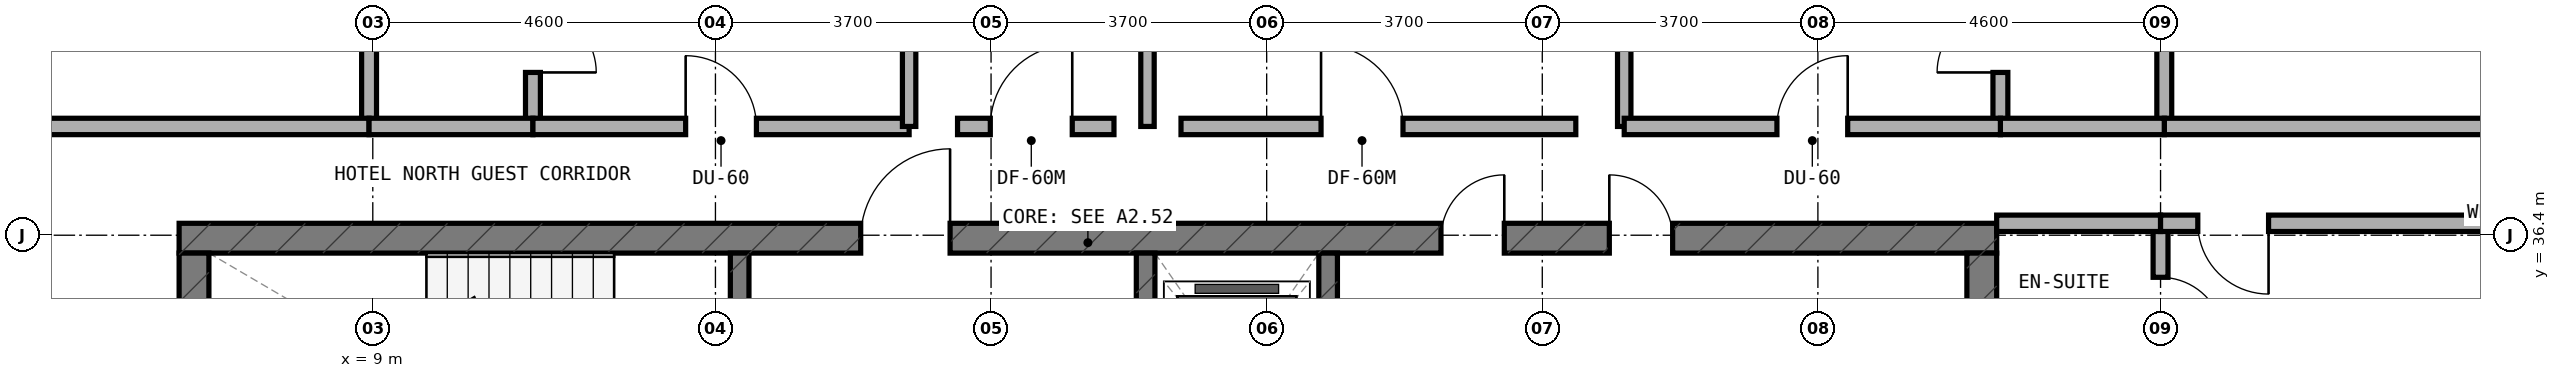
"""IFC4 building model, lengths in metres.
Left out: names, types, materials, properties, quantities, classifications, styles, units other than length and angle.
Written with IfcOpenShell. Run it as: python <this file> out.ifc"""

import sys

from ifc_helpers import new_model, si_unit, direction, frame, frame_2d, origin, place, context, subcontext, project, spatial, rectangle, extrude, element, fill, save


model = new_model("IFC4")
c1 = context("Model", 3, precision=1e-05, world=origin(), true_north=direction((0.0, 1.0)))
c2 = subcontext(c1, "Body", "Model", "MODEL_VIEW")
j1 = project(units=[si_unit("LENGTHUNIT", "METRE"), si_unit("PLANEANGLEUNIT", "RADIAN")], contexts=[c1])
p1 = place(None, origin())
s1 = spatial("IfcSite", under=j1, at=p1, CompositionType="ELEMENT")
p2 = place(p1, origin())
s2 = spatial("IfcBuilding", under=s1, at=p2, CompositionType="ELEMENT")
p3 = place(p2, frame((0.0, 0.0, 243.2)))
s3 = spatial("IfcBuildingStorey", under=s2, at=p3, CompositionType="ELEMENT", Elevation=243.2)
p4 = place(p3, frame((6.4, 36.36, 0.0), z_axis=(0.0, 0.0, 1.0), x_axis=(1.0, 0.0, 0.0)))
e1 = element("IfcWall", 1, at=p4, inside=s3, PredefinedType="SHEAR", context=c2, shape_type="SweptSolid", body=[
    extrude(rectangle(XDim=24.4, YDim=0.4, at=frame_2d((12.2, 0.0))), origin(), (0.0, 0.0, 1.0), 3.6),
])
p5 = place(p4, frame((9.15, 0.0, 0.0)))
e2 = element("IfcOpeningElement", 2, at=p5, cuts=e1, PredefinedType="OPENING", context=c2, shape_type="SweptSolid", body=[
    extrude(rectangle(XDim=1.2, YDim=2.15, at=frame_2d((0.6, 1.075))), frame((0.0, 0.21, 0.0), z_axis=(0.0, -1.0, 0.0), x_axis=(1.0, 0.0, 0.0)), (0.0, 0.0, 1.0), 0.42),
])
p6 = place(p4, frame((19.2, 0.0, 0.0)))
e3 = element("IfcOpeningElement", 3, at=p6, cuts=e1, PredefinedType="OPENING", context=c2, shape_type="SweptSolid", body=[
    extrude(rectangle(XDim=0.85, YDim=2.1, at=frame_2d((0.425, 1.05))), frame((0.0, 0.21, 0.0), z_axis=(0.0, -1.0, 0.0), x_axis=(1.0, 0.0, 0.0)), (0.0, 0.0, 1.0), 0.42),
])
p7 = place(p4, frame((16.94, 0.0, 0.0)))
e4 = element("IfcOpeningElement", 4, at=p7, cuts=e1, PredefinedType="OPENING", context=c2, shape_type="SweptSolid", body=[
    extrude(rectangle(XDim=0.85, YDim=2.1, at=frame_2d((0.425, 1.05))), frame((0.0, 0.21, 0.0), z_axis=(0.0, -1.0, 0.0), x_axis=(1.0, 0.0, 0.0)), (0.0, 0.0, 1.0), 0.42),
])
for number, where, z_axis, x_axis in (
    (5, (6.6, 33.0, 0.0), (0.0, 0.0, 1.0), (0.0, 1.0, 0.0)),
    (6, (30.6, 33.0, 0.0), (0.0, 0.0, 1.0), (0.0, 1.0, 0.0)),
):
    element("IfcWall", number, at=place(p3, frame(where, z_axis=z_axis, x_axis=x_axis)), inside=s3, PredefinedType="SHEAR", context=c2, shape_type="SweptSolid", body=[
        extrude(rectangle(XDim=3.16, YDim=0.4, at=frame_2d((1.58, 0.0))), origin(), (0.0, 0.0, 1.0), 3.6),
    ])
p8 = place(p3, frame((13.925, 33.0, 0.0), z_axis=(0.0, 0.0, 1.0), x_axis=(0.0, 1.0, 0.0)))
e7 = element("IfcWall", 7, at=p8, inside=s3, PredefinedType="STANDARD", context=c2, shape_type="SweptSolid", body=[
    extrude(rectangle(XDim=3.16, YDim=0.25, at=frame_2d((1.58, 0.0))), origin(), (0.0, 0.0, 1.0), 3.32),
])
p9 = place(p8, frame((0.98, 0.0, 0.0)))
e8 = element("IfcOpeningElement", 8, at=p9, cuts=e7, PredefinedType="OPENING", context=c2, shape_type="SweptSolid", body=[
    extrude(rectangle(XDim=1.1, YDim=2.15, at=frame_2d((0.55, 1.075))), frame((0.0, 0.135, 0.0), z_axis=(0.0, -1.0, 0.0), x_axis=(1.0, 0.0, 0.0)), (0.0, 0.0, 1.0), 0.27),
])
p10 = place(p3, frame((19.375, 33.0, 0.0), z_axis=(0.0, 0.0, 1.0), x_axis=(0.0, 1.0, 0.0)))
e9 = element("IfcWall", 9, at=p10, inside=s3, PredefinedType="STANDARD", context=c2, shape_type="SweptSolid", body=[
    extrude(rectangle(XDim=3.16, YDim=0.25, at=frame_2d((1.58, 0.0))), origin(), (0.0, 0.0, 1.0), 3.32),
])
p11 = place(p10, frame((0.98, 0.0, 0.0)))
e10 = element("IfcOpeningElement", 10, at=p11, cuts=e9, PredefinedType="OPENING", context=c2, shape_type="SweptSolid", body=[
    extrude(rectangle(XDim=1.1, YDim=2.15, at=frame_2d((0.55, 1.075))), frame((0.0, 0.135, 0.0), z_axis=(0.0, -1.0, 0.0), x_axis=(1.0, 0.0, 0.0)), (0.0, 0.0, 1.0), 0.27),
])
p12 = place(p3, frame((21.825, 33.0, 0.0), z_axis=(0.0, 0.0, 1.0), x_axis=(0.0, 1.0, 0.0)))
e11 = element("IfcWall", 11, at=p12, inside=s3, PredefinedType="STANDARD", context=c2, shape_type="SweptSolid", body=[
    extrude(rectangle(XDim=3.16, YDim=0.25, at=frame_2d((1.58, 0.0))), origin(), (0.0, 0.0, 1.0), 3.32),
])
p13 = place(p3, frame((11.15, 37.96, 0.0), z_axis=(0.0, 0.0, 1.0), x_axis=(0.0, 1.0, 0.0)))
e12 = element("IfcWall", 12, at=p13, inside=s3, PredefinedType="PLUMBINGWALL", context=c2, shape_type="SweptSolid", body=[
    extrude(rectangle(XDim=2.1, YDim=0.2, at=frame_2d((1.05, 0.0))), origin(), (0.0, 0.0, 1.0), 2.995),
])
p14 = place(p13, frame((0.625, 0.0, 0.0)))
e13 = element("IfcOpeningElement", 13, at=p14, cuts=e12, PredefinedType="OPENING", context=c2, shape_type="SweptSolid", body=[
    extrude(rectangle(XDim=0.85, YDim=2.1, at=frame_2d((0.425, 1.05))), frame((0.0, 0.11, 0.0), z_axis=(0.0, -1.0, 0.0), x_axis=(1.0, 0.0, 0.0)), (0.0, 0.0, 1.0), 0.22),
])
p15 = place(p3, frame((8.95, 37.96, 0.0), z_axis=(0.0, 0.0, 1.0), x_axis=(0.0, 1.0, 0.0)))
e14 = element("IfcWall", 14, at=p15, inside=s3, PredefinedType="PLUMBINGWALL", context=c2, shape_type="SweptSolid", body=[
    extrude(rectangle(XDim=2.1, YDim=0.2, at=frame_2d((1.05, 0.0))), origin(), (0.0, 0.0, 1.0), 2.995),
])
p16 = place(p3, frame((2.76, 37.86, 0.0), z_axis=(0.0, 0.0, 1.0), x_axis=(1.0, 0.0, 0.0)))
e15 = element("IfcWall", 15, at=p16, inside=s3, PredefinedType="SOLIDWALL", context=c2, shape_type="SweptSolid", body=[
    extrude(rectangle(XDim=6.19, YDim=0.22, at=frame_2d((3.095, 0.0))), origin(), (0.0, 0.0, 1.0), 2.745),
])
p17 = place(p3, frame((8.95, 37.86, 0.0), z_axis=(0.0, 0.0, 1.0), x_axis=(1.0, 0.0, 0.0)))
e16 = element("IfcWall", 16, at=p17, inside=s3, PredefinedType="SOLIDWALL", context=c2, shape_type="SweptSolid", body=[
    extrude(rectangle(XDim=2.2, YDim=0.22, at=frame_2d((1.1, 0.0))), origin(), (0.0, 0.0, 1.0), 3.32),
])
p18 = place(p3, frame((11.15, 37.86, 0.0), z_axis=(0.0, 0.0, 1.0), x_axis=(1.0, 0.0, 0.0)))
e17 = element("IfcWall", 17, at=p18, inside=s3, PredefinedType="SOLIDWALL", context=c2, shape_type="SweptSolid", body=[
    extrude(rectangle(XDim=5.05, YDim=0.22, at=frame_2d((2.525, 0.0))), origin(), (0.0, 0.0, 1.0), 2.745),
])
p19 = place(p18, frame((2.05, 0.0, 0.0)))
e18 = element("IfcOpeningElement", 18, at=p19, cuts=e17, PredefinedType="OPENING", context=c2, shape_type="SweptSolid", body=[
    extrude(rectangle(XDim=0.95, YDim=2.1, at=frame_2d((0.475, 1.05))), frame((0.0, 0.12, 0.0), z_axis=(0.0, -1.0, 0.0), x_axis=(1.0, 0.0, 0.0)), (0.0, 0.0, 1.0), 0.24),
])
p20 = place(p3, frame((16.2, 37.86, 0.0), z_axis=(0.0, 0.0, 1.0), x_axis=(0.0, 1.0, 0.0)))
e19 = element("IfcWall", 19, at=p20, inside=s3, PredefinedType="SOLIDWALL", context=c2, shape_type="SweptSolid", body=[
    extrude(rectangle(XDim=5.68, YDim=0.18, at=frame_2d((2.84, 0.0))), origin(), (0.0, 0.0, 1.0), 2.745),
])
p21 = place(p3, frame((19.4, 37.86, 0.0), z_axis=(0.0, 0.0, 1.0), x_axis=(0.0, 1.0, 0.0)))
e20 = element("IfcWall", 20, at=p21, inside=s3, PredefinedType="SOLIDWALL", context=c2, shape_type="SweptSolid", body=[
    extrude(rectangle(XDim=5.68, YDim=0.18, at=frame_2d((2.84, 0.0))), origin(), (0.0, 0.0, 1.0), 2.995),
])
p22 = place(p3, frame((16.85, 37.86, 0.0), z_axis=(0.0, 0.0, 1.0), x_axis=(1.0, 0.0, 0.0)))
e21 = element("IfcWall", 21, at=p22, inside=s3, PredefinedType="SOLIDWALL", context=c2, shape_type="SweptSolid", body=[
    extrude(rectangle(XDim=2.1, YDim=0.22, at=frame_2d((1.05, 0.0))), origin(), (0.0, 0.0, 1.0), 3.32),
])
p23 = place(p22, frame((0.44, 0.0, 0.0)))
e22 = element("IfcOpeningElement", 22, at=p23, cuts=e21, PredefinedType="OPENING", context=c2, shape_type="SweptSolid", body=[
    extrude(rectangle(XDim=1.1, YDim=2.1, at=frame_2d((0.55, 1.05))), frame((0.0, 0.12, 0.0), z_axis=(0.0, -1.0, 0.0), x_axis=(1.0, 0.0, 0.0)), (0.0, 0.0, 1.0), 0.24),
])
p24 = place(p3, frame((19.85, 37.86, 0.0), z_axis=(0.0, 0.0, 1.0), x_axis=(1.0, 0.0, 0.0)))
e23 = element("IfcWall", 23, at=p24, inside=s3, PredefinedType="SOLIDWALL", context=c2, shape_type="SweptSolid", body=[
    extrude(rectangle(XDim=5.3, YDim=0.22, at=frame_2d((2.65, 0.0))), origin(), (0.0, 0.0, 1.0), 3.32),
])
p25 = place(p24, frame((1.88, 0.0, 0.0)))
e24 = element("IfcOpeningElement", 24, at=p25, cuts=e23, PredefinedType="OPENING", context=c2, shape_type="SweptSolid", body=[
    extrude(rectangle(XDim=1.1, YDim=2.1, at=frame_2d((0.55, 1.05))), frame((0.0, 0.12, 0.0), z_axis=(0.0, -1.0, 0.0), x_axis=(1.0, 0.0, 0.0)), (0.0, 0.0, 1.0), 0.24),
])
p26 = place(p3, frame((25.8, 37.86, 0.0), z_axis=(0.0, 0.0, 1.0), x_axis=(0.0, 1.0, 0.0)))
e25 = element("IfcWall", 25, at=p26, inside=s3, PredefinedType="SOLIDWALL", context=c2, shape_type="SweptSolid", body=[
    extrude(rectangle(XDim=5.68, YDim=0.18, at=frame_2d((2.84, 0.0))), origin(), (0.0, 0.0, 1.0), 2.745),
])
p27 = place(p3, frame((30.85, 37.96, 0.0), z_axis=(0.0, 0.0, 1.0), x_axis=(0.0, 1.0, 0.0)))
e26 = element("IfcWall", 26, at=p27, inside=s3, PredefinedType="PLUMBINGWALL", context=c2, shape_type="SweptSolid", body=[
    extrude(rectangle(XDim=2.1, YDim=0.2, at=frame_2d((1.05, 0.0))), origin(), (0.0, 0.0, 1.0), 2.995),
])
p28 = place(p27, frame((0.625, 0.0, 0.0)))
e27 = element("IfcOpeningElement", 27, at=p28, cuts=e26, PredefinedType="OPENING", context=c2, shape_type="SweptSolid", body=[
    extrude(rectangle(XDim=0.85, YDim=2.1, at=frame_2d((0.425, 1.05))), frame((0.0, 0.11, 0.0), z_axis=(0.0, -1.0, 0.0), x_axis=(1.0, 0.0, 0.0)), (0.0, 0.0, 1.0), 0.22),
])
p29 = place(p3, frame((33.05, 37.96, 0.0), z_axis=(0.0, 0.0, 1.0), x_axis=(0.0, 1.0, 0.0)))
e28 = element("IfcWall", 28, at=p29, inside=s3, PredefinedType="PLUMBINGWALL", context=c2, shape_type="SweptSolid", body=[
    extrude(rectangle(XDim=2.1, YDim=0.2, at=frame_2d((1.05, 0.0))), origin(), (0.0, 0.0, 1.0), 2.995),
])
p30 = place(p3, frame((33.05, 37.86, 0.0), z_axis=(0.0, 0.0, 1.0), x_axis=(1.0, 0.0, 0.0)))
e29 = element("IfcWall", 29, at=p30, inside=s3, PredefinedType="SOLIDWALL", context=c2, shape_type="SweptSolid", body=[
    extrude(rectangle(XDim=6.19, YDim=0.22, at=frame_2d((3.095, 0.0))), origin(), (0.0, 0.0, 1.0), 2.745),
])
p31 = place(p3, frame((30.85, 37.86, 0.0), z_axis=(0.0, 0.0, 1.0), x_axis=(1.0, 0.0, 0.0)))
e30 = element("IfcWall", 30, at=p31, inside=s3, PredefinedType="SOLIDWALL", context=c2, shape_type="SweptSolid", body=[
    extrude(rectangle(XDim=2.2, YDim=0.22, at=frame_2d((1.1, 0.0))), origin(), (0.0, 0.0, 1.0), 3.32),
])
p32 = place(p3, frame((25.8, 37.86, 0.0), z_axis=(0.0, 0.0, 1.0), x_axis=(1.0, 0.0, 0.0)))
e31 = element("IfcWall", 31, at=p32, inside=s3, PredefinedType="SOLIDWALL", context=c2, shape_type="SweptSolid", body=[
    extrude(rectangle(XDim=5.05, YDim=0.22, at=frame_2d((2.525, 0.0))), origin(), (0.0, 0.0, 1.0), 2.745),
])
p33 = place(p32, frame((2.05, 0.0, 0.0)))
e32 = element("IfcOpeningElement", 32, at=p33, cuts=e31, PredefinedType="OPENING", context=c2, shape_type="SweptSolid", body=[
    extrude(rectangle(XDim=0.95, YDim=2.1, at=frame_2d((0.475, 1.05))), frame((0.0, 0.12, 0.0), z_axis=(0.0, -1.0, 0.0), x_axis=(1.0, 0.0, 0.0)), (0.0, 0.0, 1.0), 0.24),
])
p34 = place(p3, frame((33.0, 34.36, 0.0), z_axis=(0.0, 0.0, 1.0), x_axis=(0.0, 1.0, 0.0)))
e33 = element("IfcWall", 33, at=p34, inside=s3, PredefinedType="PLUMBINGWALL", context=c2, shape_type="SweptSolid", body=[
    extrude(rectangle(XDim=2.1, YDim=0.2, at=frame_2d((1.05, 0.0))), origin(), (0.0, 0.0, 1.0), 3.32),
])
p35 = place(p34, frame((0.625, 0.0, 0.0)))
e34 = element("IfcOpeningElement", 34, at=p35, cuts=e33, PredefinedType="OPENING", context=c2, shape_type="SweptSolid", body=[
    extrude(rectangle(XDim=0.85, YDim=2.1, at=frame_2d((0.425, 1.05))), frame((0.0, 0.11, 0.0), z_axis=(0.0, -1.0, 0.0), x_axis=(1.0, 0.0, 0.0)), (0.0, 0.0, 1.0), 0.22),
])
p36 = place(p3, frame((30.8, 36.56, 0.0), z_axis=(0.0, 0.0, 1.0), x_axis=(1.0, 0.0, 0.0)))
e35 = element("IfcWall", 35, at=p36, inside=s3, PredefinedType="SOLIDWALL", context=c2, shape_type="SweptSolid", body=[
    extrude(rectangle(XDim=2.2, YDim=0.22, at=frame_2d((1.1, 0.0))), origin(), (0.0, 0.0, 1.0), 3.32),
])
p37 = place(p3, frame((33.0, 36.56, 0.0), z_axis=(0.0, 0.0, 1.0), x_axis=(1.0, 0.0, 0.0)))
e36 = element("IfcWall", 36, at=p37, inside=s3, PredefinedType="SOLIDWALL", context=c2, shape_type="SweptSolid", body=[
    extrude(rectangle(XDim=6.4, YDim=0.22, at=frame_2d((3.2, 0.0))), origin(), (0.0, 0.0, 1.0), 2.745),
])
p38 = place(p37, frame((0.5, 0.0, 0.0)))
e37 = element("IfcOpeningElement", 37, at=p38, cuts=e36, PredefinedType="OPENING", context=c2, shape_type="SweptSolid", body=[
    extrude(rectangle(XDim=0.95, YDim=2.1, at=frame_2d((0.475, 1.05))), frame((0.0, 0.12, 0.0), z_axis=(0.0, -1.0, 0.0), x_axis=(1.0, 0.0, 0.0)), (0.0, 0.0, 1.0), 0.24),
])
p39 = place(p5, origin())
e38 = element("IfcDoor", 38, at=p39, inside=s3, OperationType="SINGLE_SWING_RIGHT", PredefinedType="DOOR", context=c2, shape_type="SweptSolid", body=[
    extrude(rectangle(XDim=1.2, YDim=2.15, at=frame_2d((0.6, 1.075))), frame((0.0, 0.025, 0.0), z_axis=(0.0, -1.0, 0.0), x_axis=(1.0, 0.0, 0.0)), (0.0, 0.0, 1.0), 0.05),
])
fill(e2, e38)
p40 = place(p6, origin())
e39 = element("IfcDoor", 39, at=p40, inside=s3, OperationType="SINGLE_SWING_LEFT", PredefinedType="DOOR", context=c2, shape_type="SweptSolid", body=[
    extrude(rectangle(XDim=0.85, YDim=2.1, at=frame_2d((0.425, 1.05))), frame((0.0, 0.025, 0.0), z_axis=(0.0, -1.0, 0.0), x_axis=(1.0, 0.0, 0.0)), (0.0, 0.0, 1.0), 0.05),
])
fill(e3, e39)
p41 = place(p7, origin())
e40 = element("IfcDoor", 40, at=p41, inside=s3, OperationType="SINGLE_SWING_RIGHT", PredefinedType="DOOR", context=c2, shape_type="SweptSolid", body=[
    extrude(rectangle(XDim=0.85, YDim=2.1, at=frame_2d((0.425, 1.05))), frame((0.0, 0.025, 0.0), z_axis=(0.0, -1.0, 0.0), x_axis=(1.0, 0.0, 0.0)), (0.0, 0.0, 1.0), 0.05),
])
fill(e4, e40)
p42 = place(p14, frame((0.85, 0.0, 0.0), z_axis=(0.0, 0.0, 1.0), x_axis=(-1.0, 0.0, 0.0)))
e41 = element("IfcDoor", 41, at=p42, inside=s3, OperationType="SINGLE_SWING_RIGHT", PredefinedType="DOOR", context=c2, shape_type="SweptSolid", body=[
    extrude(rectangle(XDim=0.85, YDim=2.1, at=frame_2d((0.425, 1.05))), frame((0.0, 0.025, 0.0), z_axis=(0.0, -1.0, 0.0), x_axis=(1.0, 0.0, 0.0)), (0.0, 0.0, 1.0), 0.05),
])
fill(e13, e41)
p43 = place(p19, origin())
e42 = element("IfcDoor", 42, at=p43, inside=s3, OperationType="SINGLE_SWING_LEFT", PredefinedType="DOOR", context=c2, shape_type="SweptSolid", body=[
    extrude(rectangle(XDim=0.95, YDim=2.1, at=frame_2d((0.475, 1.05))), frame((0.0, 0.025, 0.0), z_axis=(0.0, -1.0, 0.0), x_axis=(1.0, 0.0, 0.0)), (0.0, 0.0, 1.0), 0.05),
])
fill(e18, e42)
p44 = place(p23, origin())
e43 = element("IfcDoor", 43, at=p44, inside=s3, OperationType="SINGLE_SWING_RIGHT", PredefinedType="DOOR", context=c2, shape_type="SweptSolid", body=[
    extrude(rectangle(XDim=1.1, YDim=2.1, at=frame_2d((0.55, 1.05))), frame((0.0, 0.025, 0.0), z_axis=(0.0, -1.0, 0.0), x_axis=(1.0, 0.0, 0.0)), (0.0, 0.0, 1.0), 0.05),
])
fill(e22, e43)
p45 = place(p25, origin())
e44 = element("IfcDoor", 44, at=p45, inside=s3, OperationType="SINGLE_SWING_LEFT", PredefinedType="DOOR", context=c2, shape_type="SweptSolid", body=[
    extrude(rectangle(XDim=1.1, YDim=2.1, at=frame_2d((0.55, 1.05))), frame((0.0, 0.025, 0.0), z_axis=(0.0, -1.0, 0.0), x_axis=(1.0, 0.0, 0.0)), (0.0, 0.0, 1.0), 0.05),
])
fill(e24, e44)
p46 = place(p28, origin())
e45 = element("IfcDoor", 45, at=p46, inside=s3, OperationType="SINGLE_SWING_LEFT", PredefinedType="DOOR", context=c2, shape_type="SweptSolid", body=[
    extrude(rectangle(XDim=0.85, YDim=2.1, at=frame_2d((0.425, 1.05))), frame((0.0, 0.025, 0.0), z_axis=(0.0, -1.0, 0.0), x_axis=(1.0, 0.0, 0.0)), (0.0, 0.0, 1.0), 0.05),
])
fill(e27, e45)
p47 = place(p33, origin())
e46 = element("IfcDoor", 46, at=p47, inside=s3, OperationType="SINGLE_SWING_RIGHT", PredefinedType="DOOR", context=c2, shape_type="SweptSolid", body=[
    extrude(rectangle(XDim=0.95, YDim=2.1, at=frame_2d((0.475, 1.05))), frame((0.0, 0.025, 0.0), z_axis=(0.0, -1.0, 0.0), x_axis=(1.0, 0.0, 0.0)), (0.0, 0.0, 1.0), 0.05),
])
fill(e32, e46)
p48 = place(p35, frame((0.85, 0.0, 0.0), z_axis=(0.0, 0.0, 1.0), x_axis=(-1.0, 0.0, 0.0)))
e47 = element("IfcDoor", 47, at=p48, inside=s3, OperationType="SINGLE_SWING_RIGHT", PredefinedType="DOOR", context=c2, shape_type="SweptSolid", body=[
    extrude(rectangle(XDim=0.85, YDim=2.1, at=frame_2d((0.425, 1.05))), frame((0.0, 0.025, 0.0), z_axis=(0.0, -1.0, 0.0), x_axis=(1.0, 0.0, 0.0)), (0.0, 0.0, 1.0), 0.05),
])
fill(e34, e47)
p49 = place(p38, frame((0.95, 0.0, 0.0), z_axis=(0.0, 0.0, 1.0), x_axis=(-1.0, 0.0, 0.0)))
e48 = element("IfcDoor", 48, at=p49, inside=s3, OperationType="SINGLE_SWING_LEFT", PredefinedType="DOOR", context=c2, shape_type="SweptSolid", body=[
    extrude(rectangle(XDim=0.95, YDim=2.1, at=frame_2d((0.475, 1.05))), frame((0.0, 0.025, 0.0), z_axis=(0.0, -1.0, 0.0), x_axis=(1.0, 0.0, 0.0)), (0.0, 0.0, 1.0), 0.05),
])
fill(e37, e48)
save(model, sys.argv[1])
